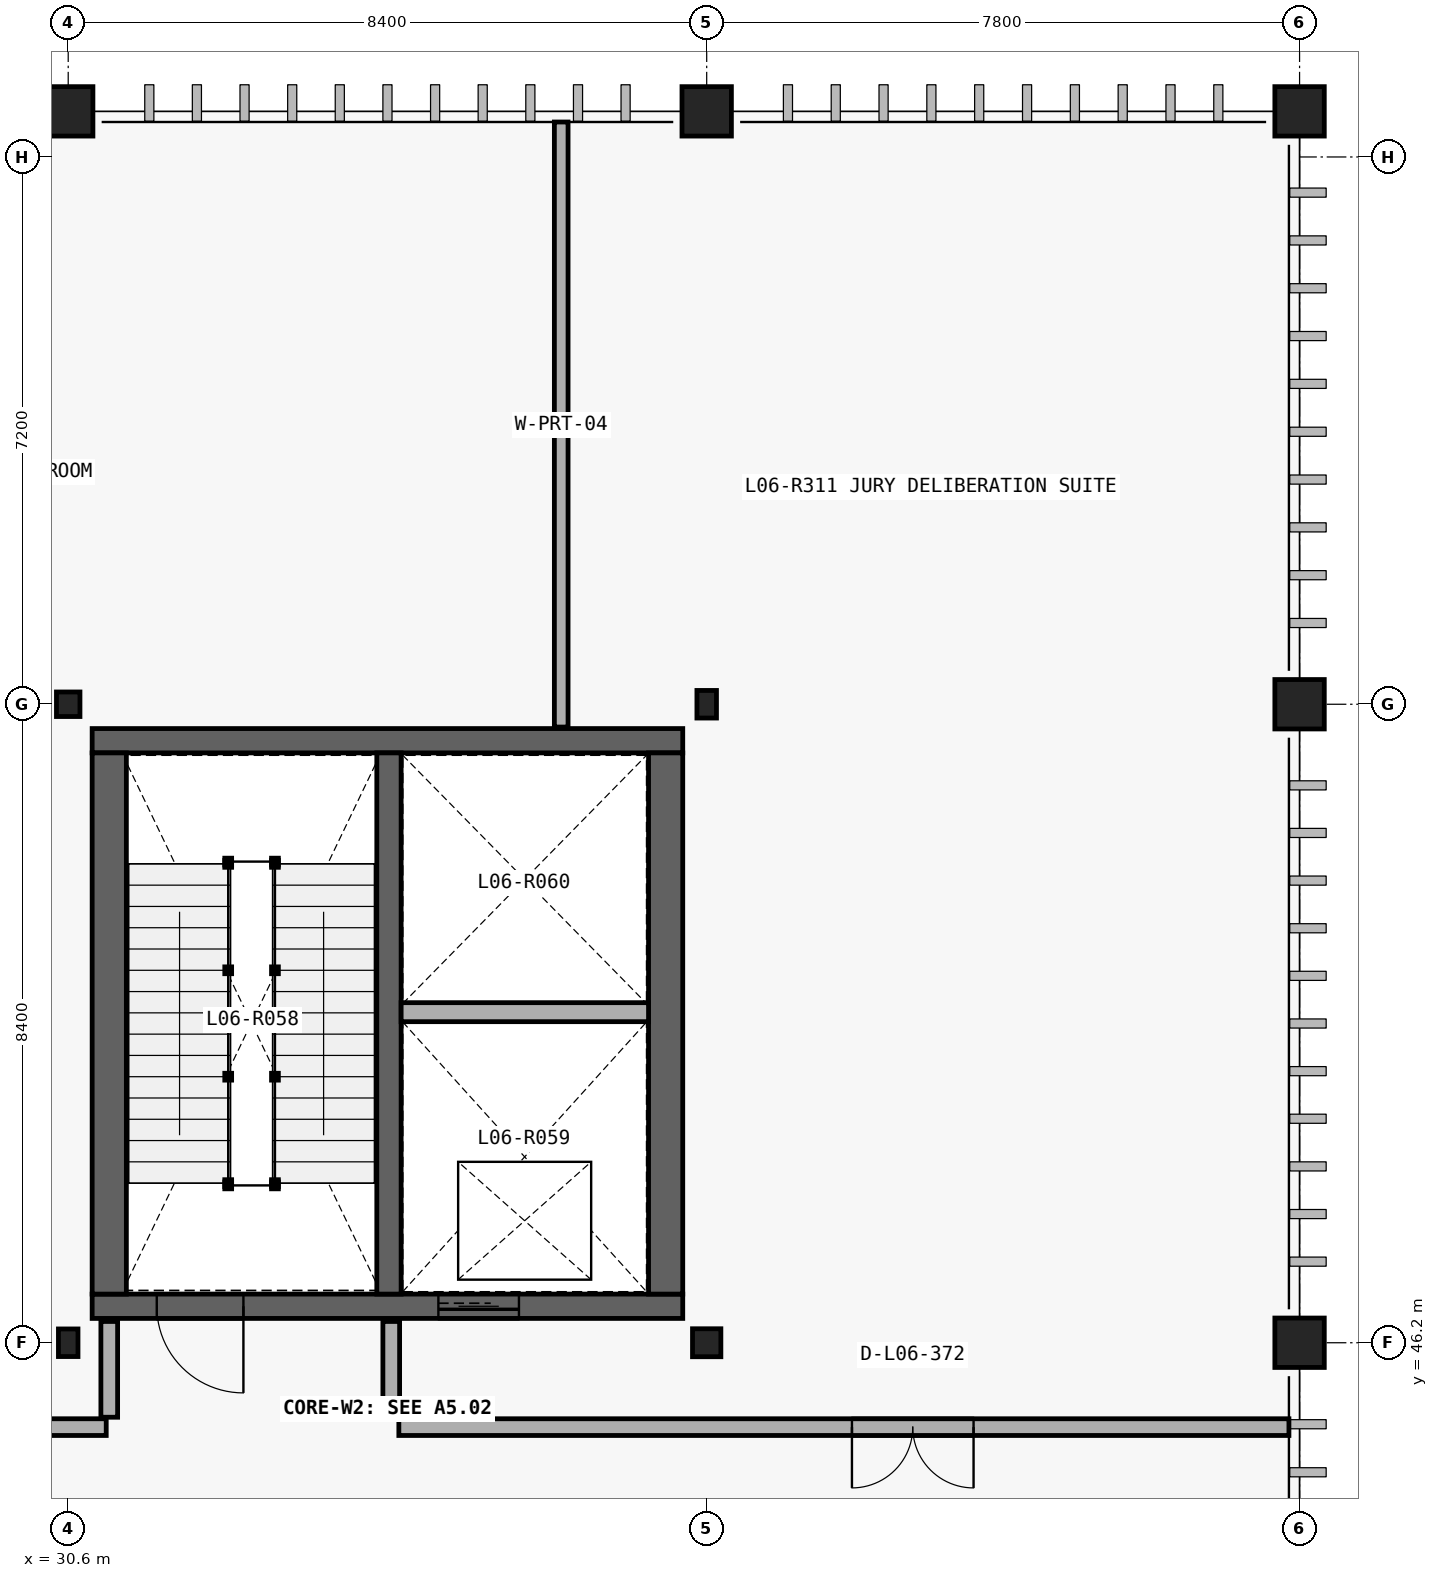
"""IFC4 building model, lengths in metres.
Left out: names, types, materials, properties, quantities, classifications, styles, units other than length and angle.
Written with IfcOpenShell. Run it as: python <this file> out.ifc"""

import sys

from ifc_helpers import new_model, si_unit, direction, frame, frame_2d, origin_with_axes, origin_2d_with_axis, place, context, subcontext, project, spatial, rectangle, circle, i_section, extrude, element, fill, save


model = new_model("IFC4")
c1 = context("Model", 3, precision=1e-05, world=origin_with_axes(), true_north=direction((0.0, 1.0)))
c2 = subcontext(c1, "Body", "Model", "MODEL_VIEW")
j1 = project(units=[si_unit("LENGTHUNIT", "METRE"), si_unit("PLANEANGLEUNIT", "RADIAN")], contexts=[c1])
p1 = place(None, origin_with_axes())
s1 = spatial("IfcSite", under=j1, at=p1, CompositionType="ELEMENT")
p2 = place(p1, origin_with_axes())
s2 = spatial("IfcBuilding", under=s1, at=p2, CompositionType="ELEMENT")
p3 = place(p2, frame((0.0, 0.0, 29.7), z_axis=(0.0, 0.0, 1.0), x_axis=(1.0, 0.0, 0.0)))
s3 = spatial("IfcBuildingStorey", under=s2, at=p3, CompositionType="ELEMENT", Elevation=29.7)
p4 = place(None, frame((30.915, 46.68, 29.7), z_axis=(0.0, 0.0, 1.0), x_axis=(1.0, 0.0, 0.0)))
e1 = element("IfcWall", 1, at=p4, inside=s3, PredefinedType="SHEAR", context=c2, shape_type="SweptSolid", body=[
    extrude(rectangle(XDim=7.77, YDim=0.32, at=frame_2d((3.885, 0.0), x_axis=(1.0, 0.0))), origin_with_axes(), (0.0, 0.0, 1.0), 4.8),
])
p5 = place(None, frame((32.335, 46.68, 29.7), z_axis=(0.0, 0.0, 1.0), x_axis=(1.0, 0.0, 0.0)))
e2 = element("IfcOpeningElement", 2, at=p5, cuts=e1, PredefinedType="OPENING", context=c2, shape_type="SweptSolid", body=[
    extrude(rectangle(XDim=1.14, YDim=2.18, at=frame_2d((0.0, 1.09), x_axis=(1.0, 0.0))), frame((0.0, 0.17, 0.0), z_axis=(0.0, -1.0, 0.0), x_axis=(1.0, 0.0, 0.0)), (0.0, 0.0, 1.0), 0.34),
])
p6 = place(None, frame((36.0, 46.68, 29.7), z_axis=(0.0, 0.0, 1.0), x_axis=(1.0, 0.0, 0.0)))
e3 = element("IfcOpeningElement", 3, at=p6, cuts=e1, PredefinedType="OPENING", context=c2, shape_type="SweptSolid", body=[
    extrude(rectangle(XDim=1.06, YDim=2.16, at=frame_2d((0.0, 1.08), x_axis=(1.0, 0.0))), frame((0.0, 0.17, 0.0), z_axis=(0.0, -1.0, 0.0), x_axis=(1.0, 0.0, 0.0)), (0.0, 0.0, 1.0), 0.34),
])
p7 = place(None, frame((38.685, 54.12, 29.7), z_axis=(0.0, 0.0, 1.0), x_axis=(-1.0, 0.0, 0.0)))
e4 = element("IfcWall", 4, at=p7, inside=s3, PredefinedType="SHEAR", context=c2, shape_type="SweptSolid", body=[
    extrude(rectangle(XDim=7.77, YDim=0.32, at=frame_2d((3.885, 0.0), x_axis=(1.0, 0.0))), origin_with_axes(), (0.0, 0.0, 1.0), 4.8),
])
for number, where, z_axis, x_axis in (
    (5, (38.46, 46.84, 29.7), (0.0, 0.0, 1.0), (0.0, 1.0, 0.0)),
    (6, (31.14, 53.96, 29.7), (0.0, 0.0, 1.0), (0.0, -1.0, 0.0)),
):
    element("IfcWall", number, at=place(None, frame(where, z_axis=z_axis, x_axis=x_axis)), inside=s3, PredefinedType="SHEAR", context=c2, shape_type="SweptSolid", body=[
        extrude(rectangle(XDim=7.12, YDim=0.45, at=frame_2d((3.56, 0.0), x_axis=(1.0, 0.0))), origin_with_axes(), (0.0, 0.0, 1.0), 4.8),
    ])
p8 = place(None, frame((34.82, 46.84, 29.7), z_axis=(0.0, 0.0, 1.0), x_axis=(0.0, 1.0, 0.0)))
e7 = element("IfcWall", 7, at=p8, inside=s3, PredefinedType="SHEAR", context=c2, shape_type="SweptSolid", body=[
    extrude(rectangle(XDim=7.12, YDim=0.32, at=frame_2d((3.56, 0.0), x_axis=(1.0, 0.0))), origin_with_axes(), (0.0, 0.0, 1.0), 4.8),
])
p9 = place(None, frame((34.98, 50.549, 29.7), z_axis=(0.0, 0.0, 1.0), x_axis=(1.0, 0.0, 0.0)))
e8 = element("IfcWall", 8, at=p9, inside=s3, PredefinedType="PARTITIONING", context=c2, shape_type="SweptSolid", body=[
    extrude(rectangle(XDim=3.255, YDim=0.25, at=frame_2d((1.627, 0.0), x_axis=(1.0, 0.0))), origin_with_axes(), (0.0, 0.0, 1.0), 4.48),
])
for number, where, z_axis, x_axis in (
    (9, (31.14, 45.22, 29.7), (0.0, 0.0, 1.0), (0.0, 1.0, 0.0)),
    (10, (34.85, 45.22, 29.7), (0.0, 0.0, 1.0), (0.0, 1.0, 0.0)),
):
    element("IfcWall", number, at=place(None, frame(where, z_axis=z_axis, x_axis=x_axis)), inside=s3, PredefinedType="PARTITIONING", context=c2, shape_type="SweptSolid", body=[
        extrude(rectangle(XDim=1.26, YDim=0.22, at=frame_2d((0.63, 0.0), x_axis=(1.0, 0.0))), origin_with_axes(), (0.0, 0.0, 1.0), 4.48),
    ])
p10 = place(None, frame((25.355, 45.09, 29.7), z_axis=(0.0, 0.0, 1.0), x_axis=(1.0, 0.0, 0.0)))
e11 = element("IfcWall", 11, at=p10, inside=s3, PredefinedType="PARTITIONING", context=c2, shape_type="SweptSolid", body=[
    extrude(rectangle(XDim=5.745, YDim=0.22, at=frame_2d((2.873, 0.0), x_axis=(1.0, 0.0))), origin_with_axes(), (0.0, 0.0, 1.0), 4.48),
])
p11 = place(None, frame((28.227, 45.09, 29.7), z_axis=(0.0, 0.0, 1.0), x_axis=(1.0, 0.0, 0.0)))
e12 = element("IfcOpeningElement", 12, at=p11, cuts=e11, PredefinedType="OPENING", context=c2, shape_type="SweptSolid", body=[
    extrude(rectangle(XDim=1.88, YDim=2.56, at=frame_2d((0.0, 1.28), x_axis=(1.0, 0.0))), frame((0.0, 0.12, 0.0), z_axis=(0.0, -1.0, 0.0), x_axis=(1.0, 0.0, 0.0)), (0.0, 0.0, 1.0), 0.24),
])
p12 = place(None, frame((34.95, 45.09, 29.7), z_axis=(0.0, 0.0, 1.0), x_axis=(1.0, 0.0, 0.0)))
e13 = element("IfcWall", 13, at=p12, inside=s3, PredefinedType="PARTITIONING", context=c2, shape_type="SweptSolid", body=[
    extrude(rectangle(XDim=11.71, YDim=0.22, at=frame_2d((5.855, 0.0), x_axis=(1.0, 0.0))), origin_with_axes(), (0.0, 0.0, 1.0), 4.48),
])
p13 = place(None, frame((41.711, 45.09, 29.7), z_axis=(0.0, 0.0, 1.0), x_axis=(1.0, 0.0, 0.0)))
e14 = element("IfcOpeningElement", 14, at=p13, cuts=e13, PredefinedType="OPENING", context=c2, shape_type="SweptSolid", body=[
    extrude(rectangle(XDim=1.6, YDim=2.32, at=frame_2d((0.0, 1.16), x_axis=(1.0, 0.0))), frame((0.0, 0.12, 0.0), z_axis=(0.0, -1.0, 0.0), x_axis=(1.0, 0.0, 0.0)), (0.0, 0.0, 1.0), 0.24),
])
p14 = place(None, frame((37.086, 54.3, 29.7), z_axis=(0.0, 0.0, 1.0), x_axis=(0.0, 1.0, 0.0)))
e15 = element("IfcWall", 15, at=p14, inside=s3, PredefinedType="PARTITIONING", context=c2, shape_type="SweptSolid", body=[
    extrude(rectangle(XDim=7.96, YDim=0.18, at=frame_2d((3.98, 0.0), x_axis=(1.0, 0.0))), origin_with_axes(), (0.0, 0.0, 1.0), 4.48),
])
p15 = place(None, frame((30.6, 46.2, 29.7), z_axis=(0.0, 0.0, 1.0), x_axis=(1.0, 0.0, 0.0)))
e16 = element("IfcColumn", 16, at=p15, inside=s3, PredefinedType="COLUMN", context=c2, shape_type="SweptSolid", body=[
    extrude(i_section(OverallWidth=0.257, OverallDepth=0.363, WebThickness=0.013, FlangeThickness=0.022, at=origin_2d_with_axis()), origin_with_axes(), (0.0, 0.0, 1.0), 4.8),
])
p16 = place(None, frame((30.6, 54.6, 29.7), z_axis=(0.0, 0.0, 1.0), x_axis=(1.0, 0.0, 0.0)))
e17 = element("IfcColumn", 17, at=p16, inside=s3, PredefinedType="COLUMN", context=c2, shape_type="SweptSolid", body=[
    extrude(i_section(OverallWidth=0.309, OverallDepth=0.323, WebThickness=0.014, FlangeThickness=0.023, at=origin_2d_with_axis()), origin_with_axes(), (0.0, 0.0, 1.0), 4.8),
])
p17 = place(None, frame((30.6, 62.4, 29.7), z_axis=(0.0, 0.0, 1.0), x_axis=(1.0, 0.0, 0.0)))
e18 = element("IfcColumn", 18, at=p17, inside=s3, PredefinedType="COLUMN", context=c2, shape_type="SweptSolid", body=[
    extrude(circle(Radius=0.325, at=origin_2d_with_axis()), origin_with_axes(), (0.0, 0.0, 1.0), 4.8),
])
p18 = place(None, frame((39.0, 46.2, 29.7), z_axis=(0.0, 0.0, 1.0), x_axis=(1.0, 0.0, 0.0)))
e19 = element("IfcColumn", 19, at=p18, inside=s3, PredefinedType="COLUMN", context=c2, shape_type="SweptSolid", body=[
    extrude(i_section(OverallWidth=0.373, OverallDepth=0.368, WebThickness=0.015, FlangeThickness=0.024, at=origin_2d_with_axis()), origin_with_axes(), (0.0, 0.0, 1.0), 4.8),
])
p19 = place(None, frame((39.0, 54.6, 29.7), z_axis=(0.0, 0.0, 1.0), x_axis=(1.0, 0.0, 0.0)))
e20 = element("IfcColumn", 20, at=p19, inside=s3, PredefinedType="COLUMN", context=c2, shape_type="SweptSolid", body=[
    extrude(i_section(OverallWidth=0.257, OverallDepth=0.363, WebThickness=0.013, FlangeThickness=0.022, at=origin_2d_with_axis()), origin_with_axes(), (0.0, 0.0, 1.0), 4.8),
])
for number, where, z_axis, x_axis in (
    (21, (39.0, 62.4, 29.7), (0.0, 0.0, 1.0), (1.0, 0.0, 0.0)),
    (22, (46.8, 46.2, 29.7), (0.0, 0.0, 1.0), (1.0, 0.0, 0.0)),
    (23, (46.8, 54.6, 29.7), (0.0, 0.0, 1.0), (1.0, 0.0, 0.0)),
    (24, (46.8, 62.4, 29.7), (0.0, 0.0, 1.0), (1.0, 0.0, 0.0)),
):
    element("IfcColumn", number, at=place(None, frame(where, z_axis=z_axis, x_axis=x_axis)), inside=s3, PredefinedType="COLUMN", context=c2, shape_type="SweptSolid", body=[
        extrude(circle(Radius=0.325, at=origin_2d_with_axis()), origin_with_axes(), (0.0, 0.0, 1.0), 4.8),
    ])
p20 = place(None, frame((32.335, 46.68, 29.7), z_axis=(0.0, 0.0, 1.0), x_axis=(-1.0, 0.0, 0.0)))
e25 = element("IfcDoor", 25, at=p20, inside=s3, OperationType="SINGLE_SWING_RIGHT", PredefinedType="DOOR", context=c2, shape_type="SweptSolid", body=[
    extrude(rectangle(XDim=1.14, YDim=2.18, at=frame_2d((0.0, 1.09), x_axis=(1.0, 0.0))), frame((0.0, 0.04, 0.0), z_axis=(0.0, -1.0, 0.0), x_axis=(1.0, 0.0, 0.0)), (0.0, 0.0, 1.0), 0.08),
])
fill(e2, e25)
p21 = place(None, frame((36.0, 46.68, 29.7), z_axis=(0.0, 0.0, 1.0), x_axis=(-1.0, 0.0, 0.0)))
e26 = element("IfcDoor", 26, at=p21, inside=s3, OperationType="SLIDING_TO_LEFT", PredefinedType="DOOR", context=c2, shape_type="SweptSolid", body=[
    extrude(rectangle(XDim=1.06, YDim=2.16, at=frame_2d((0.0, 1.08), x_axis=(1.0, 0.0))), frame((0.0, 0.04, 0.0), z_axis=(0.0, -1.0, 0.0), x_axis=(1.0, 0.0, 0.0)), (0.0, 0.0, 1.0), 0.08),
])
fill(e3, e26)
p22 = place(None, frame((41.711, 45.09, 29.7), z_axis=(0.0, 0.0, 1.0), x_axis=(-1.0, 0.0, 0.0)))
e27 = element("IfcDoor", 27, at=p22, inside=s3, OperationType="DOUBLE_DOOR_SINGLE_SWING", PredefinedType="DOOR", context=c2, shape_type="SweptSolid", body=[
    extrude(rectangle(XDim=1.6, YDim=2.32, at=frame_2d((0.0, 1.16), x_axis=(1.0, 0.0))), frame((0.0, 0.04, 0.0), z_axis=(0.0, -1.0, 0.0), x_axis=(1.0, 0.0, 0.0)), (0.0, 0.0, 1.0), 0.08),
])
fill(e14, e27)
save(model, sys.argv[1])
